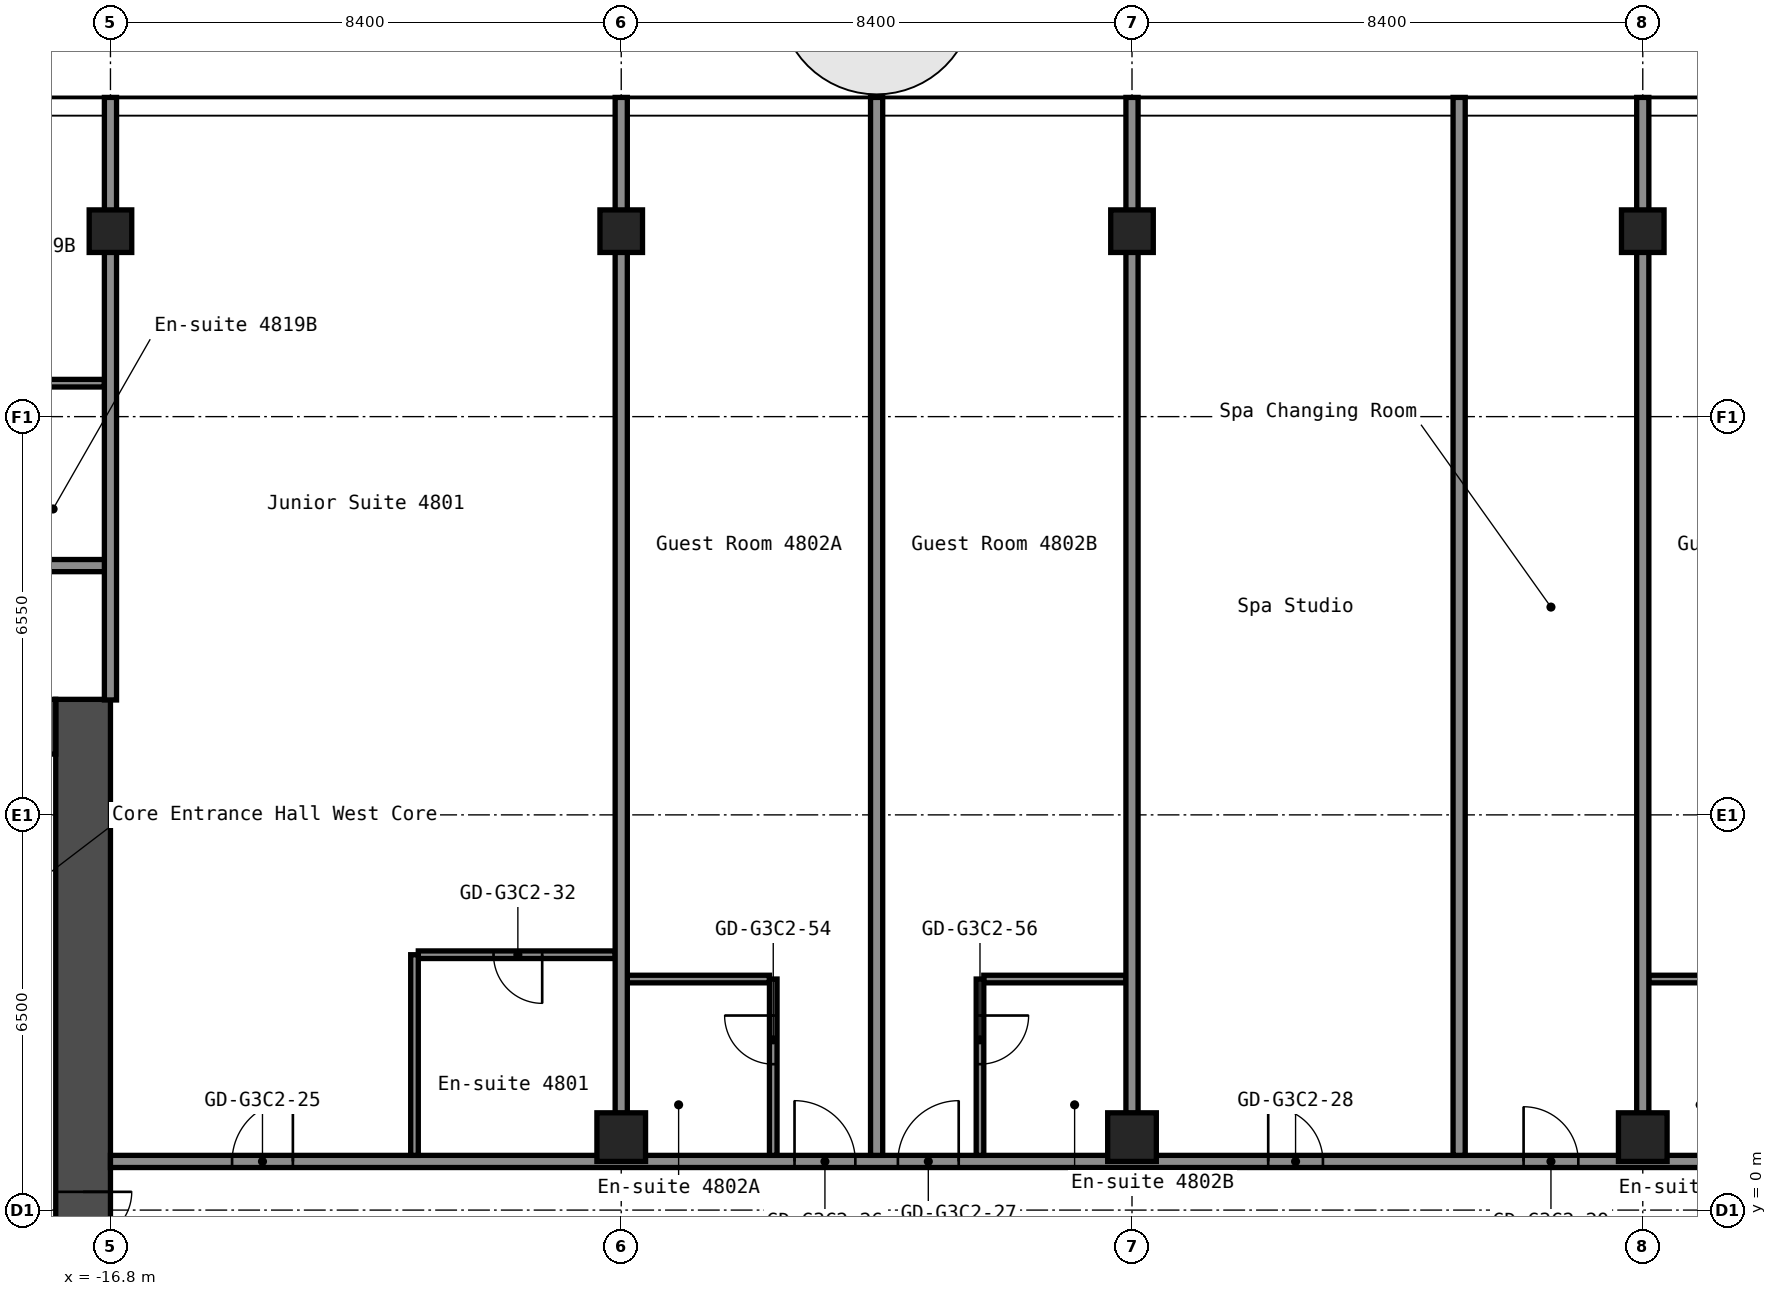
"""IFC4 building model, lengths in metres.
Left out: names, types, materials, properties, quantities, classifications, styles, units other than length and angle.
Written with IfcOpenShell. Run it as: python <this file> out.ifc"""

import sys

from ifc_helpers import new_model, si_unit, direction, frame, frame_2d, origin, origin_2d, place, context, subcontext, project, spatial, rectangle, hollow_rectangle, extrude, element, fill, save


model = new_model("IFC4")
c1 = context("Model", 3, precision=1e-05, world=origin(), true_north=direction((0.0, 1.0)))
c2 = subcontext(c1, "Body", "Model", "MODEL_VIEW")
j1 = project(units=[si_unit("LENGTHUNIT", "METRE"), si_unit("PLANEANGLEUNIT", "RADIAN")], contexts=[c1])
p1 = place(None, origin())
s1 = spatial("IfcSite", under=j1, at=p1, CompositionType="ELEMENT")
p2 = place(p1, origin())
s2 = spatial("IfcBuilding", under=s1, at=p2, CompositionType="ELEMENT")
p3 = place(p2, frame((0.0, 0.0, 169.4)))
s3 = spatial("IfcBuildingStorey", under=s2, at=p3, CompositionType="ELEMENT", Elevation=169.4)
p4 = place(p3, frame((-16.8, 16.1, 0.0), z_axis=(0.0, 0.0, 1.0), x_axis=(1.0, 0.0, 0.0)))
e1 = element("IfcColumn", 1, at=p4, inside=s3, PredefinedType="COLUMN", context=c2, shape_type="SweptSolid", body=[
    extrude(hollow_rectangle(XDim=0.7, YDim=0.7, WallThickness=0.028, at=origin_2d()), origin(), (0.0, 0.0, 1.0), 2.75),
])
p5 = place(p3, frame((-8.4, 1.2, 0.0), z_axis=(0.0, 0.0, 1.0), x_axis=(1.0, 0.0, 0.0)))
e2 = element("IfcColumn", 2, at=p5, inside=s3, PredefinedType="COLUMN", context=c2, shape_type="SweptSolid", body=[
    extrude(hollow_rectangle(XDim=0.8, YDim=0.8, WallThickness=0.032, at=origin_2d()), origin(), (0.0, 0.0, 1.0), 2.75),
])
p6 = place(p3, frame((-8.4, 16.1, 0.0), z_axis=(0.0, 0.0, 1.0), x_axis=(1.0, 0.0, 0.0)))
e3 = element("IfcColumn", 3, at=p6, inside=s3, PredefinedType="COLUMN", context=c2, shape_type="SweptSolid", body=[
    extrude(hollow_rectangle(XDim=0.7, YDim=0.7, WallThickness=0.028, at=origin_2d()), origin(), (0.0, 0.0, 1.0), 2.75),
])
p7 = place(p3, frame((0.0, 1.2, 0.0), z_axis=(0.0, 0.0, 1.0), x_axis=(1.0, 0.0, 0.0)))
e4 = element("IfcColumn", 4, at=p7, inside=s3, PredefinedType="COLUMN", context=c2, shape_type="SweptSolid", body=[
    extrude(hollow_rectangle(XDim=0.8, YDim=0.8, WallThickness=0.032, at=origin_2d()), origin(), (0.0, 0.0, 1.0), 2.75),
])
p8 = place(p3, frame((0.0, 16.1, 0.0), z_axis=(0.0, 0.0, 1.0), x_axis=(1.0, 0.0, 0.0)))
e5 = element("IfcColumn", 5, at=p8, inside=s3, PredefinedType="COLUMN", context=c2, shape_type="SweptSolid", body=[
    extrude(hollow_rectangle(XDim=0.7, YDim=0.7, WallThickness=0.028, at=origin_2d()), origin(), (0.0, 0.0, 1.0), 2.75),
])
p9 = place(p3, frame((8.4, 1.2, 0.0), z_axis=(0.0, 0.0, 1.0), x_axis=(1.0, 0.0, 0.0)))
e6 = element("IfcColumn", 6, at=p9, inside=s3, PredefinedType="COLUMN", context=c2, shape_type="SweptSolid", body=[
    extrude(hollow_rectangle(XDim=0.8, YDim=0.8, WallThickness=0.032, at=origin_2d()), origin(), (0.0, 0.0, 1.0), 2.75),
])
p10 = place(p3, frame((8.4, 16.1, 0.0), z_axis=(0.0, 0.0, 1.0), x_axis=(1.0, 0.0, 0.0)))
e7 = element("IfcColumn", 7, at=p10, inside=s3, PredefinedType="COLUMN", context=c2, shape_type="SweptSolid", body=[
    extrude(hollow_rectangle(XDim=0.7, YDim=0.7, WallThickness=0.028, at=origin_2d()), origin(), (0.0, 0.0, 1.0), 2.75),
])
p11 = place(p3, frame((-17.25, -8.4, 0.0), z_axis=(0.0, 0.0, 1.0), x_axis=(0.0, 1.0, 0.0)))
e8 = element("IfcWall", 8, at=p11, inside=s3, PredefinedType="SHEAR", context=c2, shape_type="SweptSolid", body=[
    extrude(rectangle(XDim=16.8, YDim=0.9, at=frame_2d((8.4, 0.0))), origin(), (0.0, 0.0, 1.0), 2.75),
])
p12 = place(p11, frame((7.1, 0.0, 0.0)))
e9 = element("IfcOpeningElement", 9, at=p12, cuts=e8, PredefinedType="OPENING", context=c2, shape_type="SweptSolid", body=[
    extrude(rectangle(XDim=1.6, YDim=2.1, at=frame_2d((0.8, 1.05))), frame((0.0, 0.46, 0.0), z_axis=(0.0, -1.0, 0.0), x_axis=(1.0, 0.0, 0.0)), (0.0, 0.0, 1.0), 0.92),
])
p13 = place(p3, frame((-32.7, 7.95, 0.0), z_axis=(0.0, 0.0, 1.0), x_axis=(1.0, 0.0, 0.0)))
e10 = element("IfcWall", 10, at=p13, inside=s3, PredefinedType="SHEAR", context=c2, shape_type="SweptSolid", body=[
    extrude(rectangle(XDim=15.0, YDim=0.9, at=frame_2d((7.5, 0.0))), origin(), (0.0, 0.0, 1.0), 2.75),
])
p14 = place(p13, frame((3.4, 0.0, 0.0)))
e11 = element("IfcOpeningElement", 11, at=p14, cuts=e10, PredefinedType="OPENING", context=c2, shape_type="SweptSolid", body=[
    extrude(rectangle(XDim=1.2, YDim=2.1, at=frame_2d((0.6, 1.05))), frame((0.0, 0.46, 0.0), z_axis=(0.0, -1.0, 0.0), x_axis=(1.0, 0.0, 0.0)), (0.0, 0.0, 1.0), 0.92),
])
p15 = place(p13, frame((0.75, 0.0, 0.0)))
e12 = element("IfcOpeningElement", 12, at=p15, cuts=e10, PredefinedType="OPENING", context=c2, shape_type="SweptSolid", body=[
    extrude(rectangle(XDim=0.9, YDim=2.1, at=frame_2d((0.45, 1.05))), frame((0.0, 0.46, 0.0), z_axis=(0.0, -1.0, 0.0), x_axis=(1.0, 0.0, 0.0)), (0.0, 0.0, 1.0), 0.92),
])
p16 = place(p3, frame((-16.8, 0.8, 0.0), z_axis=(0.0, 0.0, 1.0), x_axis=(1.0, 0.0, 0.0)))
e13 = element("IfcWall", 13, at=p16, inside=s3, PredefinedType="PARTITIONING", context=c2, shape_type="SweptSolid", body=[
    extrude(rectangle(XDim=33.6, YDim=0.2, at=frame_2d((16.8, 0.0))), origin(), (0.0, 0.0, 1.0), 2.75),
])
p17 = place(p16, frame((2.0, 0.0, 0.0)))
e14 = element("IfcOpeningElement", 14, at=p17, cuts=e13, PredefinedType="OPENING", context=c2, shape_type="SweptSolid", body=[
    extrude(rectangle(XDim=1.0, YDim=2.1, at=frame_2d((0.5, 1.05))), frame((0.0, 0.11, 0.0), z_axis=(0.0, -1.0, 0.0), x_axis=(1.0, 0.0, 0.0)), (0.0, 0.0, 1.0), 0.22),
])
p18 = place(p16, frame((11.25, 0.0, 0.0)))
e15 = element("IfcOpeningElement", 15, at=p18, cuts=e13, PredefinedType="OPENING", context=c2, shape_type="SweptSolid", body=[
    extrude(rectangle(XDim=1.0, YDim=2.1, at=frame_2d((0.5, 1.05))), frame((0.0, 0.11, 0.0), z_axis=(0.0, -1.0, 0.0), x_axis=(1.0, 0.0, 0.0)), (0.0, 0.0, 1.0), 0.22),
])
p19 = place(p16, frame((12.95, 0.0, 0.0)))
e16 = element("IfcOpeningElement", 16, at=p19, cuts=e13, PredefinedType="OPENING", context=c2, shape_type="SweptSolid", body=[
    extrude(rectangle(XDim=1.0, YDim=2.1, at=frame_2d((0.5, 1.05))), frame((0.0, 0.11, 0.0), z_axis=(0.0, -1.0, 0.0), x_axis=(1.0, 0.0, 0.0)), (0.0, 0.0, 1.0), 0.22),
])
p20 = place(p16, frame((19.04, 0.0, 0.0)))
e17 = element("IfcOpeningElement", 17, at=p20, cuts=e13, PredefinedType="OPENING", context=c2, shape_type="SweptSolid", body=[
    extrude(rectangle(XDim=0.9, YDim=2.1, at=frame_2d((0.45, 1.05))), frame((0.0, 0.11, 0.0), z_axis=(0.0, -1.0, 0.0), x_axis=(1.0, 0.0, 0.0)), (0.0, 0.0, 1.0), 0.22),
])
p21 = place(p16, frame((23.24, 0.0, 0.0)))
e18 = element("IfcOpeningElement", 18, at=p21, cuts=e13, PredefinedType="OPENING", context=c2, shape_type="SweptSolid", body=[
    extrude(rectangle(XDim=0.9, YDim=2.1, at=frame_2d((0.45, 1.05))), frame((0.0, 0.11, 0.0), z_axis=(0.0, -1.0, 0.0), x_axis=(1.0, 0.0, 0.0)), (0.0, 0.0, 1.0), 0.22),
])
p22 = place(p16, frame((28.05, 0.0, 0.0)))
e19 = element("IfcOpeningElement", 19, at=p22, cuts=e13, PredefinedType="OPENING", context=c2, shape_type="SweptSolid", body=[
    extrude(rectangle(XDim=1.0, YDim=2.1, at=frame_2d((0.5, 1.05))), frame((0.0, 0.11, 0.0), z_axis=(0.0, -1.0, 0.0), x_axis=(1.0, 0.0, 0.0)), (0.0, 0.0, 1.0), 0.22),
])
p23 = place(p16, frame((29.75, 0.0, 0.0)))
e20 = element("IfcOpeningElement", 20, at=p23, cuts=e13, PredefinedType="OPENING", context=c2, shape_type="SweptSolid", body=[
    extrude(rectangle(XDim=1.0, YDim=2.1, at=frame_2d((0.5, 1.05))), frame((0.0, 0.11, 0.0), z_axis=(0.0, -1.0, 0.0), x_axis=(1.0, 0.0, 0.0)), (0.0, 0.0, 1.0), 0.22),
])
p24 = place(p3, frame((-8.3, 3.8, 0.0), z_axis=(0.0, 0.0, 1.0), x_axis=(1.0, 0.0, 0.0)))
e21 = element("IfcWall", 21, at=p24, inside=s3, PredefinedType="PARTITIONING", context=c2, shape_type="SweptSolid", body=[
    extrude(rectangle(XDim=2.338, YDim=0.125, at=frame_2d((1.169, 0.0))), origin(), (0.0, 0.0, 1.0), 2.75),
])
for number, where, z_axis, x_axis in (
    (22, (-2.438, 3.8, 0.0), (0.0, 0.0, 1.0), (1.0, 0.0, 0.0)),
    (23, (8.5, 3.8, 0.0), (0.0, 0.0, 1.0), (1.0, 0.0, 0.0)),
):
    element("IfcWall", number, at=place(p3, frame(where, z_axis=z_axis, x_axis=x_axis)), inside=s3, PredefinedType="PARTITIONING", context=c2, shape_type="SweptSolid", body=[
        extrude(rectangle(XDim=2.337, YDim=0.125, at=frame_2d((1.169, 0.0))), origin(), (0.0, 0.0, 1.0), 2.75),
    ])
p25 = place(p3, frame((-11.738, 4.2, 0.0), z_axis=(0.0, 0.0, 1.0), x_axis=(1.0, 0.0, 0.0)))
e24 = element("IfcWall", 24, at=p25, inside=s3, PredefinedType="PARTITIONING", context=c2, shape_type="SweptSolid", body=[
    extrude(rectangle(XDim=3.238, YDim=0.125, at=frame_2d((1.619, 0.0))), origin(), (0.0, 0.0, 1.0), 2.75),
])
p26 = place(p25, frame((1.238, 0.0, 0.0)))
e25 = element("IfcOpeningElement", 25, at=p26, cuts=e24, PredefinedType="OPENING", context=c2, shape_type="SweptSolid", body=[
    extrude(rectangle(XDim=0.8, YDim=2.1, at=frame_2d((0.4, 1.05))), frame((0.0, 0.073, 0.0), z_axis=(0.0, -1.0, 0.0), x_axis=(1.0, 0.0, 0.0)), (0.0, 0.0, 1.0), 0.145),
])
p27 = place(p3, frame((-42.7, 10.6, 0.0), z_axis=(0.0, 0.0, 1.0), x_axis=(1.0, 0.0, 0.0)))
e26 = element("IfcWall", 26, at=p27, inside=s3, PredefinedType="PARTITIONING", context=c2, shape_type="SweptSolid", body=[
    extrude(rectangle(XDim=25.9, YDim=0.2, at=frame_2d((12.95, 0.0))), origin(), (0.0, 0.0, 1.0), 2.75),
])
p28 = place(p27, frame((3.25, 0.0, 0.0)))
e27 = element("IfcOpeningElement", 27, at=p28, cuts=e26, PredefinedType="OPENING", context=c2, shape_type="SweptSolid", body=[
    extrude(rectangle(XDim=1.0, YDim=2.1, at=frame_2d((0.5, 1.05))), frame((0.0, 0.11, 0.0), z_axis=(0.0, -1.0, 0.0), x_axis=(1.0, 0.0, 0.0)), (0.0, 0.0, 1.0), 0.22),
])
p29 = place(p27, frame((5.15, 0.0, 0.0)))
e28 = element("IfcOpeningElement", 28, at=p29, cuts=e26, PredefinedType="OPENING", context=c2, shape_type="SweptSolid", body=[
    extrude(rectangle(XDim=1.0, YDim=2.1, at=frame_2d((0.5, 1.05))), frame((0.0, 0.11, 0.0), z_axis=(0.0, -1.0, 0.0), x_axis=(1.0, 0.0, 0.0)), (0.0, 0.0, 1.0), 0.22),
])
p30 = place(p27, frame((14.5, 0.0, 0.0)))
e29 = element("IfcOpeningElement", 29, at=p30, cuts=e26, PredefinedType="OPENING", context=c2, shape_type="SweptSolid", body=[
    extrude(rectangle(XDim=1.0, YDim=2.1, at=frame_2d((0.5, 1.05))), frame((0.0, 0.11, 0.0), z_axis=(0.0, -1.0, 0.0), x_axis=(1.0, 0.0, 0.0)), (0.0, 0.0, 1.0), 0.22),
])
p31 = place(p27, frame((20.35, 0.0, 0.0)))
e30 = element("IfcOpeningElement", 30, at=p31, cuts=e26, PredefinedType="OPENING", context=c2, shape_type="SweptSolid", body=[
    extrude(rectangle(XDim=1.0, YDim=2.1, at=frame_2d((0.5, 1.05))), frame((0.0, 0.11, 0.0), z_axis=(0.0, -1.0, 0.0), x_axis=(1.0, 0.0, 0.0)), (0.0, 0.0, 1.0), 0.22),
])
p32 = place(p27, frame((22.05, 0.0, 0.0)))
e31 = element("IfcOpeningElement", 31, at=p32, cuts=e26, PredefinedType="OPENING", context=c2, shape_type="SweptSolid", body=[
    extrude(rectangle(XDim=1.0, YDim=2.1, at=frame_2d((0.5, 1.05))), frame((0.0, 0.11, 0.0), z_axis=(0.0, -1.0, 0.0), x_axis=(1.0, 0.0, 0.0)), (0.0, 0.0, 1.0), 0.22),
])
p33 = place(p3, frame((-19.238, 13.6, 0.0), z_axis=(0.0, 0.0, 1.0), x_axis=(1.0, 0.0, 0.0)))
e32 = element("IfcWall", 32, at=p33, inside=s3, PredefinedType="PARTITIONING", context=c2, shape_type="SweptSolid", body=[
    extrude(rectangle(XDim=2.338, YDim=0.125, at=frame_2d((1.169, 0.0))), origin(), (0.0, 0.0, 1.0), 2.75),
])
p34 = place(p3, frame((-16.8, 8.39, 0.0), z_axis=(0.0, 0.0, 1.0), x_axis=(0.0, 1.0, 0.0)))
e33 = element("IfcWall", 33, at=p34, inside=s3, PredefinedType="PARTITIONING", context=c2, shape_type="SweptSolid", body=[
    extrude(rectangle(XDim=9.91, YDim=0.2, at=frame_2d((4.955, 0.0))), origin(), (0.0, 0.0, 1.0), 2.75),
])
p35 = place(p3, frame((-11.8, 0.9, 0.0), z_axis=(0.0, 0.0, 1.0), x_axis=(0.0, 1.0, 0.0)))
e34 = element("IfcWall", 34, at=p35, inside=s3, PredefinedType="PARTITIONING", context=c2, shape_type="SweptSolid", body=[
    extrude(rectangle(XDim=3.3, YDim=0.125, at=frame_2d((1.65, 0.0))), origin(), (0.0, 0.0, 1.0), 2.75),
])
p36 = place(p3, frame((-8.4, 1.59, 0.0), z_axis=(0.0, 0.0, 1.0), x_axis=(0.0, 1.0, 0.0)))
e35 = element("IfcWall", 35, at=p36, inside=s3, PredefinedType="PARTITIONING", context=c2, shape_type="SweptSolid", body=[
    extrude(rectangle(XDim=16.71, YDim=0.2, at=frame_2d((8.355, 0.0))), origin(), (0.0, 0.0, 1.0), 2.75),
])
p37 = place(p3, frame((-5.9, 0.9, 0.0), z_axis=(0.0, 0.0, 1.0), x_axis=(0.0, 1.0, 0.0)))
e36 = element("IfcWall", 36, at=p37, inside=s3, PredefinedType="PARTITIONING", context=c2, shape_type="SweptSolid", body=[
    extrude(rectangle(XDim=2.9, YDim=0.125, at=frame_2d((1.45, 0.0))), origin(), (0.0, 0.0, 1.0), 2.75),
])
p38 = place(p37, frame((1.5, 0.0, 0.0)))
e37 = element("IfcOpeningElement", 37, at=p38, cuts=e36, PredefinedType="OPENING", context=c2, shape_type="SweptSolid", body=[
    extrude(rectangle(XDim=0.8, YDim=2.1, at=frame_2d((0.4, 1.05))), frame((0.0, 0.073, 0.0), z_axis=(0.0, -1.0, 0.0), x_axis=(1.0, 0.0, 0.0)), (0.0, 0.0, 1.0), 0.145),
])
p39 = place(p3, frame((-4.2, 0.9, 0.0), z_axis=(0.0, 0.0, 1.0), x_axis=(0.0, 1.0, 0.0)))
e38 = element("IfcWall", 38, at=p39, inside=s3, PredefinedType="PARTITIONING", context=c2, shape_type="SweptSolid", body=[
    extrude(rectangle(XDim=17.4, YDim=0.2, at=frame_2d((8.7, 0.0))), origin(), (0.0, 0.0, 1.0), 2.75),
])
p40 = place(p3, frame((-2.5, 0.9, 0.0), z_axis=(0.0, 0.0, 1.0), x_axis=(0.0, 1.0, 0.0)))
e39 = element("IfcWall", 39, at=p40, inside=s3, PredefinedType="PARTITIONING", context=c2, shape_type="SweptSolid", body=[
    extrude(rectangle(XDim=2.9, YDim=0.125, at=frame_2d((1.45, 0.0))), origin(), (0.0, 0.0, 1.0), 2.75),
])
p41 = place(p40, frame((1.5, 0.0, 0.0)))
e40 = element("IfcOpeningElement", 40, at=p41, cuts=e39, PredefinedType="OPENING", context=c2, shape_type="SweptSolid", body=[
    extrude(rectangle(XDim=0.8, YDim=2.1, at=frame_2d((0.4, 1.05))), frame((0.0, 0.073, 0.0), z_axis=(0.0, -1.0, 0.0), x_axis=(1.0, 0.0, 0.0)), (0.0, 0.0, 1.0), 0.145),
])
p42 = place(p3, frame((0.0, 1.59, 0.0), z_axis=(0.0, 0.0, 1.0), x_axis=(0.0, 1.0, 0.0)))
e41 = element("IfcWall", 41, at=p42, inside=s3, PredefinedType="PARTITIONING", context=c2, shape_type="SweptSolid", body=[
    extrude(rectangle(XDim=16.71, YDim=0.2, at=frame_2d((8.355, 0.0))), origin(), (0.0, 0.0, 1.0), 2.75),
])
p43 = place(p3, frame((5.38, 0.9, 0.0), z_axis=(0.0, 0.0, 1.0), x_axis=(0.0, 1.0, 0.0)))
e42 = element("IfcWall", 42, at=p43, inside=s3, PredefinedType="PARTITIONING", context=c2, shape_type="SweptSolid", body=[
    extrude(rectangle(XDim=17.4, YDim=0.2, at=frame_2d((8.7, 0.0))), origin(), (0.0, 0.0, 1.0), 2.75),
])
p44 = place(p3, frame((8.4, 1.59, 0.0), z_axis=(0.0, 0.0, 1.0), x_axis=(0.0, 1.0, 0.0)))
e43 = element("IfcWall", 43, at=p44, inside=s3, PredefinedType="PARTITIONING", context=c2, shape_type="SweptSolid", body=[
    extrude(rectangle(XDim=16.71, YDim=0.2, at=frame_2d((8.355, 0.0))), origin(), (0.0, 0.0, 1.0), 2.75),
])
p45 = place(p12, origin())
e44 = element("IfcDoor", 44, at=p45, inside=s3, OperationType="DOUBLE_DOOR_SINGLE_SWING", PredefinedType="DOOR", context=c2, shape_type="SweptSolid", body=[
    extrude(rectangle(XDim=1.6, YDim=2.1, at=frame_2d((0.8, 1.05))), frame((0.0, 0.025, 0.0), z_axis=(0.0, -1.0, 0.0), x_axis=(1.0, 0.0, 0.0)), (0.0, 0.0, 1.0), 0.05),
])
fill(e9, e44)
p46 = place(p17, origin())
e45 = element("IfcDoor", 45, at=p46, inside=s3, OperationType="SINGLE_SWING_LEFT", PredefinedType="DOOR", context=c2, shape_type="SweptSolid", body=[
    extrude(rectangle(XDim=1.0, YDim=2.1, at=frame_2d((0.5, 1.05))), frame((0.0, 0.025, 0.0), z_axis=(0.0, -1.0, 0.0), x_axis=(1.0, 0.0, 0.0)), (0.0, 0.0, 1.0), 0.05),
])
fill(e14, e45)
p47 = place(p18, origin())
e46 = element("IfcDoor", 46, at=p47, inside=s3, OperationType="SINGLE_SWING_RIGHT", PredefinedType="DOOR", context=c2, shape_type="SweptSolid", body=[
    extrude(rectangle(XDim=1.0, YDim=2.1, at=frame_2d((0.5, 1.05))), frame((0.0, 0.025, 0.0), z_axis=(0.0, -1.0, 0.0), x_axis=(1.0, 0.0, 0.0)), (0.0, 0.0, 1.0), 0.05),
])
fill(e15, e46)
p48 = place(p19, origin())
e47 = element("IfcDoor", 47, at=p48, inside=s3, OperationType="SINGLE_SWING_LEFT", PredefinedType="DOOR", context=c2, shape_type="SweptSolid", body=[
    extrude(rectangle(XDim=1.0, YDim=2.1, at=frame_2d((0.5, 1.05))), frame((0.0, 0.025, 0.0), z_axis=(0.0, -1.0, 0.0), x_axis=(1.0, 0.0, 0.0)), (0.0, 0.0, 1.0), 0.05),
])
fill(e16, e47)
p49 = place(p20, origin())
e48 = element("IfcDoor", 48, at=p49, inside=s3, OperationType="SINGLE_SWING_RIGHT", PredefinedType="DOOR", context=c2, shape_type="SweptSolid", body=[
    extrude(rectangle(XDim=0.9, YDim=2.1, at=frame_2d((0.45, 1.05))), frame((0.0, 0.025, 0.0), z_axis=(0.0, -1.0, 0.0), x_axis=(1.0, 0.0, 0.0)), (0.0, 0.0, 1.0), 0.05),
])
fill(e17, e48)
p50 = place(p21, origin())
e49 = element("IfcDoor", 49, at=p50, inside=s3, OperationType="SINGLE_SWING_RIGHT", PredefinedType="DOOR", context=c2, shape_type="SweptSolid", body=[
    extrude(rectangle(XDim=0.9, YDim=2.1, at=frame_2d((0.45, 1.05))), frame((0.0, 0.025, 0.0), z_axis=(0.0, -1.0, 0.0), x_axis=(1.0, 0.0, 0.0)), (0.0, 0.0, 1.0), 0.05),
])
fill(e18, e49)
p51 = place(p26, origin())
e50 = element("IfcDoor", 50, at=p51, inside=s3, OperationType="SINGLE_SWING_RIGHT", PredefinedType="DOOR", context=c2, shape_type="SweptSolid", body=[
    extrude(rectangle(XDim=0.8, YDim=2.1, at=frame_2d((0.4, 1.05))), frame((0.0, 0.025, 0.0), z_axis=(0.0, -1.0, 0.0), x_axis=(1.0, 0.0, 0.0)), (0.0, 0.0, 1.0), 0.05),
])
fill(e25, e50)
p52 = place(p38, origin())
e51 = element("IfcDoor", 51, at=p52, inside=s3, OperationType="SINGLE_SWING_LEFT", PredefinedType="DOOR", context=c2, shape_type="SweptSolid", body=[
    extrude(rectangle(XDim=0.8, YDim=2.1, at=frame_2d((0.4, 1.05))), frame((0.0, 0.025, 0.0), z_axis=(0.0, -1.0, 0.0), x_axis=(1.0, 0.0, 0.0)), (0.0, 0.0, 1.0), 0.05),
])
fill(e37, e51)
p53 = place(p41, origin())
e52 = element("IfcDoor", 52, at=p53, inside=s3, OperationType="SINGLE_SWING_RIGHT", PredefinedType="DOOR", context=c2, shape_type="SweptSolid", body=[
    extrude(rectangle(XDim=0.8, YDim=2.1, at=frame_2d((0.4, 1.05))), frame((0.0, 0.025, 0.0), z_axis=(0.0, -1.0, 0.0), x_axis=(1.0, 0.0, 0.0)), (0.0, 0.0, 1.0), 0.05),
])
fill(e40, e52)
save(model, sys.argv[1])
